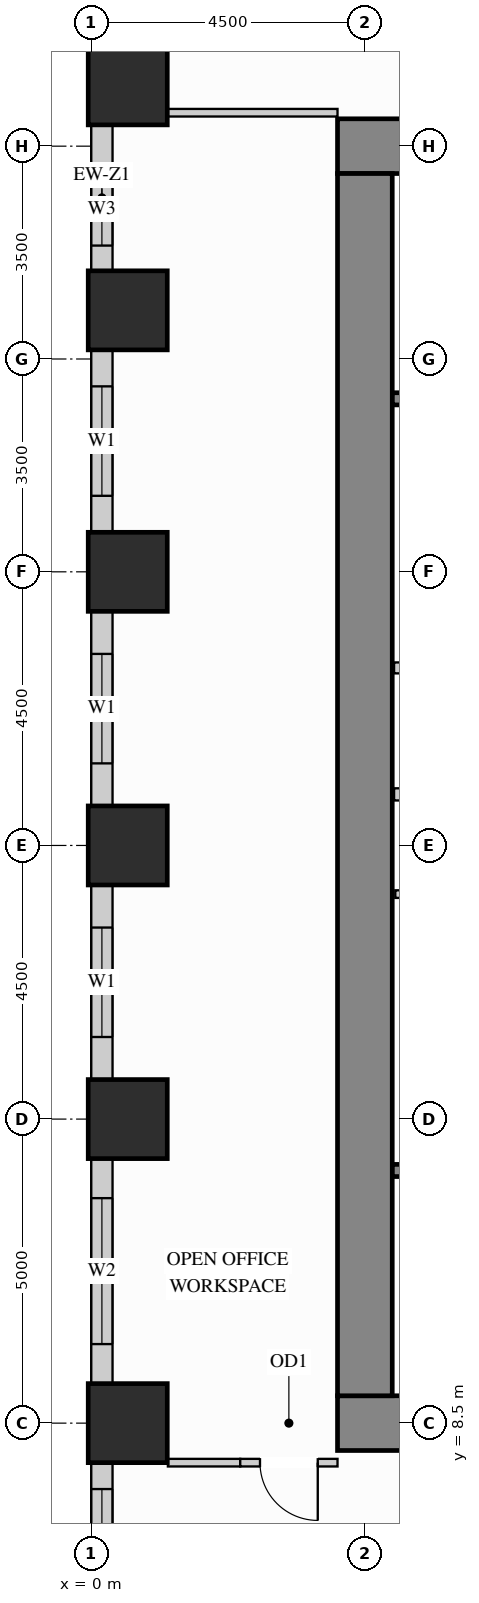
"""IFC4 building model, lengths in metres.
Left out: names, types, materials, properties, quantities, classifications, styles, units other than length and angle.
Written with IfcOpenShell. Run it as: python <this file> out.ifc"""

import sys

from ifc_helpers import new_model, si_unit, direction, frame, frame_2d, origin, origin_2d, place, context, subcontext, project, spatial, rectangle, extrude, source, transform, mapped, element, fill, save


model = new_model("IFC4")
c1 = context("Model", 3, precision=1e-05, world=origin(), true_north=direction((0.0, 1.0)))
c2 = subcontext(c1, "Body", "Model", "MODEL_VIEW")
j1 = project(units=[si_unit("LENGTHUNIT", "METRE"), si_unit("PLANEANGLEUNIT", "RADIAN")], contexts=[c1])
p1 = place(None, origin())
s1 = spatial("IfcSite", under=j1, at=p1, CompositionType="ELEMENT")
p2 = place(p1, origin())
s2 = spatial("IfcBuilding", under=s1, at=p2, CompositionType="ELEMENT")
p3 = place(p2, frame((0.0, 0.0, 65.7)))
s3 = spatial("IfcBuildingStorey", under=s2, at=p3, CompositionType="ELEMENT", Elevation=65.7)
m1 = source(origin(), c2, "Body", "SweptSolid", [
    extrude(rectangle(XDim=1.3, YDim=1.3, at=origin_2d()), origin(), (0.0, 0.0, 1.0), 3.38),
])
for number, where, z_axis, x_axis in (
    (1, (0.6, 13.5, 0.0), (0.0, 0.0, 1.0), (1.0, 0.0, 0.0)),
    (2, (0.6, 18.0, 0.0), (0.0, 0.0, 1.0), (1.0, 0.0, 0.0)),
    (3, (0.6, 22.5, 0.0), (0.0, 0.0, 1.0), (1.0, 0.0, 0.0)),
    (4, (0.6, 26.8, 0.0), (0.0, 0.0, 1.0), (1.0, 0.0, 0.0)),
    (5, (0.6, 30.5, 0.0), (0.0, 0.0, 1.0), (1.0, 0.0, 0.0)),
    (6, (0.6, 8.5, 0.0), (0.0, 0.0, 1.0), (1.0, 0.0, 0.0)),
):
    element("IfcColumn", number, at=place(p3, frame(where, z_axis=z_axis, x_axis=x_axis)), inside=s3, PredefinedType="COLUMN", context=c2, shape_type="MappedRepresentation", body=[
        mapped(m1, transform((0.0, 0.0, 0.0), x_axis=(1.0, 0.0, 0.0), y_axis=(0.0, 1.0, 0.0), z_axis=(0.0, 0.0, 1.0))),
    ])
m2 = source(origin(), c2, "Body", "SweptSolid", [
    extrude(rectangle(XDim=10.9, YDim=0.9, at=frame_2d((5.45, 0.0))), origin(), (0.0, 0.0, 1.0), 3.38),
])
for number, where, z_axis, x_axis in (
    (7, (4.05, 29.5, 0.0), (0.0, 0.0, 1.0), (1.0, 0.0, 0.0)),
    (8, (4.05, 8.5, 0.0), (0.0, 0.0, 1.0), (1.0, 0.0, 0.0)),
):
    element("IfcWall", number, at=place(p3, frame(where, z_axis=z_axis, x_axis=x_axis)), inside=s3, PredefinedType="SHEAR", context=c2, shape_type="MappedRepresentation", body=[
        mapped(m2, transform((0.0, 0.0, 0.0), x_axis=(1.0, 0.0, 0.0), y_axis=(0.0, 1.0, 0.0), z_axis=(0.0, 0.0, 1.0))),
    ])
m3 = source(origin(), c2, "Body", "SweptSolid", [
    extrude(rectangle(XDim=20.1, YDim=0.9, at=frame_2d((10.05, 0.0))), origin(), (0.0, 0.0, 1.0), 3.38),
])
p4 = place(p3, frame((4.5, 8.95, 0.0), z_axis=(0.0, 0.0, 1.0), x_axis=(0.0, 1.0, 0.0)))
e9 = element("IfcWall", 9, at=p4, inside=s3, PredefinedType="SHEAR", context=c2, shape_type="MappedRepresentation", body=[
    mapped(m3, transform((0.0, 0.0, 0.0), x_axis=(1.0, 0.0, 0.0), y_axis=(0.0, 1.0, 0.0), z_axis=(0.0, 0.0, 1.0))),
])
p5 = place(p3, frame((0.175, 29.852, 0.0), z_axis=(0.0, 0.0, 1.0), x_axis=(0.0, -1.0, 0.0)))
e10 = element("IfcWall", 10, at=p5, inside=s3, PredefinedType="SOLIDWALL", context=c2, shape_type="SweptSolid", body=[
    extrude(rectangle(XDim=2.404, YDim=0.35, at=frame_2d((1.202, 0.0))), origin(), (0.0, 0.0, 1.0), 2.51),
])
p6 = place(p5, frame((0.787, 0.0, 0.78)))
e11 = element("IfcOpeningElement", 11, at=p6, cuts=e10, PredefinedType="OPENING", context=c2, shape_type="SweptSolid", body=[
    extrude(rectangle(XDim=1.2, YDim=1.55, at=frame_2d((0.6, 0.775))), frame((0.0, 0.185, 0.0), z_axis=(0.0, -1.0, 0.0), x_axis=(1.0, 0.0, 0.0)), (0.0, 0.0, 1.0), 0.37),
])
p7 = place(p3, frame((0.175, 26.152, 0.0), z_axis=(0.0, 0.0, 1.0), x_axis=(0.0, -1.0, 0.0)))
e12 = element("IfcWall", 12, at=p7, inside=s3, PredefinedType="SOLIDWALL", context=c2, shape_type="SweptSolid", body=[
    extrude(rectangle(XDim=3.004, YDim=0.35, at=frame_2d((1.502, 0.0))), origin(), (0.0, 0.0, 1.0), 2.51),
])
p8 = place(p7, frame((0.602, 0.0, 0.78)))
e13 = element("IfcOpeningElement", 13, at=p8, cuts=e12, PredefinedType="OPENING", context=c2, shape_type="SweptSolid", body=[
    extrude(rectangle(XDim=1.8, YDim=1.55, at=frame_2d((0.9, 0.775))), frame((0.0, 0.185, 0.0), z_axis=(0.0, -1.0, 0.0), x_axis=(1.0, 0.0, 0.0)), (0.0, 0.0, 1.0), 0.37),
])
p9 = place(p3, frame((0.175, 21.852, 0.0), z_axis=(0.0, 0.0, 1.0), x_axis=(0.0, -1.0, 0.0)))
e14 = element("IfcWall", 14, at=p9, inside=s3, PredefinedType="SOLIDWALL", context=c2, shape_type="SweptSolid", body=[
    extrude(rectangle(XDim=3.204, YDim=0.35, at=frame_2d((1.602, 0.0))), origin(), (0.0, 0.0, 1.0), 2.51),
])
p10 = place(p9, frame((0.702, 0.0, 0.78)))
e15 = element("IfcOpeningElement", 15, at=p10, cuts=e14, PredefinedType="OPENING", context=c2, shape_type="SweptSolid", body=[
    extrude(rectangle(XDim=1.8, YDim=1.55, at=frame_2d((0.9, 0.775))), frame((0.0, 0.185, 0.0), z_axis=(0.0, -1.0, 0.0), x_axis=(1.0, 0.0, 0.0)), (0.0, 0.0, 1.0), 0.37),
])
p11 = place(p3, frame((0.175, 17.352, 0.0), z_axis=(0.0, 0.0, 1.0), x_axis=(0.0, -1.0, 0.0)))
e16 = element("IfcWall", 16, at=p11, inside=s3, PredefinedType="SOLIDWALL", context=c2, shape_type="SweptSolid", body=[
    extrude(rectangle(XDim=3.204, YDim=0.35, at=frame_2d((1.602, 0.0))), origin(), (0.0, 0.0, 1.0), 2.51),
])
p12 = place(p11, frame((0.702, 0.0, 0.78)))
e17 = element("IfcOpeningElement", 17, at=p12, cuts=e16, PredefinedType="OPENING", context=c2, shape_type="SweptSolid", body=[
    extrude(rectangle(XDim=1.8, YDim=1.55, at=frame_2d((0.9, 0.775))), frame((0.0, 0.185, 0.0), z_axis=(0.0, -1.0, 0.0), x_axis=(1.0, 0.0, 0.0)), (0.0, 0.0, 1.0), 0.37),
])
p13 = place(p3, frame((0.175, 12.852, 0.0), z_axis=(0.0, 0.0, 1.0), x_axis=(0.0, -1.0, 0.0)))
e18 = element("IfcWall", 18, at=p13, inside=s3, PredefinedType="SOLIDWALL", context=c2, shape_type="SweptSolid", body=[
    extrude(rectangle(XDim=3.704, YDim=0.35, at=frame_2d((1.852, 0.0))), origin(), (0.0, 0.0, 1.0), 2.51),
])
p14 = place(p13, frame((0.652, 0.0, 0.78)))
e19 = element("IfcOpeningElement", 19, at=p14, cuts=e18, PredefinedType="OPENING", context=c2, shape_type="SweptSolid", body=[
    extrude(rectangle(XDim=2.4, YDim=1.55, at=frame_2d((1.2, 0.775))), frame((0.0, 0.185, 0.0), z_axis=(0.0, -1.0, 0.0), x_axis=(1.0, 0.0, 0.0)), (0.0, 0.0, 1.0), 0.37),
])
p15 = place(p3, frame((0.175, 7.852, 0.0), z_axis=(0.0, 0.0, 1.0), x_axis=(0.0, -1.0, 0.0)))
e20 = element("IfcWall", 20, at=p15, inside=s3, PredefinedType="SOLIDWALL", context=c2, shape_type="SweptSolid", body=[
    extrude(rectangle(XDim=3.704, YDim=0.35, at=frame_2d((1.852, 0.0))), origin(), (0.0, 0.0, 1.0), 2.51),
])
p16 = place(p15, frame((0.436, 0.0, 0.78)))
e21 = element("IfcOpeningElement", 21, at=p16, cuts=e20, PredefinedType="OPENING", context=c2, shape_type="SweptSolid", body=[
    extrude(rectangle(XDim=2.4, YDim=1.55, at=frame_2d((1.2, 0.775))), frame((0.0, 0.185, 0.0), z_axis=(0.0, -1.0, 0.0), x_axis=(1.0, 0.0, 0.0)), (0.0, 0.0, 1.0), 0.37),
])
m4 = source(origin(), c2, "Body", "SweptSolid", [
    extrude(rectangle(XDim=2.17, YDim=0.18, at=frame_2d((1.085, 0.0))), origin(), (0.0, 0.0, 1.0), 3.365),
])
p17 = place(p3, frame((4.98, 20.92, 0.0), z_axis=(0.0, 0.0, 1.0), x_axis=(1.0, 0.0, 0.0)))
e22 = element("IfcWall", 22, at=p17, inside=s3, PredefinedType="PARTITIONING", context=c2, shape_type="MappedRepresentation", body=[
    mapped(m4, transform((0.0, 0.0, 0.0), x_axis=(1.0, 0.0, 0.0), y_axis=(0.0, 1.0, 0.0), z_axis=(0.0, 0.0, 1.0))),
])
p18 = place(p3, frame((5.0, 17.2, 0.0), z_axis=(0.0, 0.0, 1.0), x_axis=(1.0, 0.0, 0.0)))
e23 = element("IfcWall", 23, at=p18, inside=s3, PredefinedType="PARTITIONING", context=c2, shape_type="SweptSolid", body=[
    extrude(rectangle(XDim=2.4, YDim=0.125, at=frame_2d((1.2, 0.0))), origin(), (0.0, 0.0, 1.0), 3.365),
])
p19 = place(p18, frame((0.7, 0.0, 0.0)))
e24 = element("IfcOpeningElement", 24, at=p19, cuts=e23, PredefinedType="OPENING", context=c2, shape_type="SweptSolid", body=[
    extrude(rectangle(XDim=0.85, YDim=2.1, at=frame_2d((0.425, 1.05))), frame((0.0, 0.073, 0.0), z_axis=(0.0, -1.0, 0.0), x_axis=(1.0, 0.0, 0.0)), (0.0, 0.0, 1.0), 0.145),
])
m5 = source(origin(), c2, "Body", "SweptSolid", [
    extrude(rectangle(XDim=2.79, YDim=0.125, at=frame_2d((1.395, 0.0))), origin(), (0.0, 0.0, 1.0), 3.365),
])
p20 = place(p3, frame((1.26, 30.05, 0.0), z_axis=(0.0, 0.0, 1.0), x_axis=(1.0, 0.0, 0.0)))
e25 = element("IfcWall", 25, at=p20, inside=s3, PredefinedType="PARTITIONING", context=c2, shape_type="MappedRepresentation", body=[
    mapped(m5, transform((0.0, 0.0, 0.0), x_axis=(1.0, 0.0, 0.0), y_axis=(0.0, 1.0, 0.0), z_axis=(0.0, 0.0, 1.0))),
])
m6 = source(origin(), c2, "Body", "SweptSolid", [
    extrude(rectangle(XDim=1.19, YDim=0.125, at=frame_2d((0.595, 0.0))), origin(), (0.0, 0.0, 1.0), 3.365),
])
p21 = place(p3, frame((1.26, 7.85, 0.0), z_axis=(0.0, 0.0, 1.0), x_axis=(1.0, 0.0, 0.0)))
e26 = element("IfcWall", 26, at=p21, inside=s3, PredefinedType="PARTITIONING", context=c2, shape_type="MappedRepresentation", body=[
    mapped(m6, transform((0.0, 0.0, 0.0), x_axis=(1.0, 0.0, 0.0), y_axis=(0.0, 1.0, 0.0), z_axis=(0.0, 0.0, 1.0))),
])
p22 = place(p3, frame((2.45, 7.85, 0.0), z_axis=(0.0, 0.0, 1.0), x_axis=(1.0, 0.0, 0.0)))
e27 = element("IfcWall", 27, at=p22, inside=s3, PredefinedType="PARTITIONING", context=c2, shape_type="SweptSolid", body=[
    extrude(rectangle(XDim=1.6, YDim=0.125, at=frame_2d((0.8, 0.0))), origin(), (0.0, 0.0, 1.0), 3.365),
])
p23 = place(p22, frame((0.325, 0.0, 0.0)))
e28 = element("IfcOpeningElement", 28, at=p23, cuts=e27, PredefinedType="OPENING", context=c2, shape_type="SweptSolid", body=[
    extrude(rectangle(XDim=0.95, YDim=2.15, at=frame_2d((0.475, 1.075))), frame((0.0, 0.073, 0.0), z_axis=(0.0, -1.0, 0.0), x_axis=(1.0, 0.0, 0.0)), (0.0, 0.0, 1.0), 0.145),
])
m7 = source(origin(), c2, "Body", "SweptSolid", [
    extrude(rectangle(XDim=2.09, YDim=0.2, at=frame_2d((1.045, 0.0))), origin(), (0.0, 0.0, 1.0), 3.365),
])
p24 = place(p3, frame((4.98, 18.84, 0.0), z_axis=(0.0, 0.0, 1.0), x_axis=(1.0, 0.0, 0.0)))
e29 = element("IfcWall", 29, at=p24, inside=s3, PredefinedType="PARTITIONING", context=c2, shape_type="MappedRepresentation", body=[
    mapped(m7, transform((0.0, 0.0, 0.0), x_axis=(1.0, 0.0, 0.0), y_axis=(0.0, 1.0, 0.0), z_axis=(0.0, 0.0, 1.0))),
])
p25 = place(p3, frame((4.952, 12.655, 0.0), z_axis=(0.0, 0.0, 1.0), x_axis=(1.0, 0.0, 0.0)))
e30 = element("IfcWall", 30, at=p25, inside=s3, PredefinedType="SHEAR", context=c2, shape_type="SweptSolid", body=[
    extrude(rectangle(XDim=7.453, YDim=0.2, at=frame_2d((3.727, 0.0))), origin(), (0.0, 0.0, 1.0), 3.38),
])
p26 = place(p25, frame((0.4, 0.0, 0.0)))
e31 = element("IfcOpeningElement", 31, at=p26, cuts=e30, PredefinedType="OPENING", context=c2, shape_type="SweptSolid", body=[
    extrude(rectangle(XDim=1.1, YDim=2.15, at=frame_2d((0.55, 1.075))), frame((0.0, 0.11, 0.0), z_axis=(0.0, -1.0, 0.0), x_axis=(1.0, 0.0, 0.0)), (0.0, 0.0, 1.0), 0.22),
])
p27 = place(p3, frame((4.952, 25.345, 0.0), z_axis=(0.0, 0.0, 1.0), x_axis=(1.0, 0.0, 0.0)))
e32 = element("IfcWall", 32, at=p27, inside=s3, PredefinedType="SHEAR", context=c2, shape_type="SweptSolid", body=[
    extrude(rectangle(XDim=7.453, YDim=0.2, at=frame_2d((3.727, 0.0))), origin(), (0.0, 0.0, 1.0), 3.38),
])
p28 = place(p27, frame((0.4, 0.0, 0.0)))
e33 = element("IfcOpeningElement", 33, at=p28, cuts=e32, PredefinedType="OPENING", context=c2, shape_type="SweptSolid", body=[
    extrude(rectangle(XDim=1.1, YDim=2.15, at=frame_2d((0.55, 1.075))), frame((0.0, 0.11, 0.0), z_axis=(0.0, -1.0, 0.0), x_axis=(1.0, 0.0, 0.0)), (0.0, 0.0, 1.0), 0.22),
])
m8 = source(origin(), c2, "Body", "SweptSolid", [
    extrude(rectangle(XDim=0.95, YDim=2.15, at=frame_2d((0.475, 1.075))), frame((0.0, 0.025, 0.0), z_axis=(0.0, -1.0, 0.0), x_axis=(1.0, 0.0, 0.0)), (0.0, 0.0, 1.0), 0.05),
])
p29 = place(p23, origin())
e34 = element("IfcDoor", 34, at=p29, inside=s3, OperationType="SINGLE_SWING_RIGHT", PredefinedType="DOOR", context=c2, shape_type="MappedRepresentation", body=[
    mapped(m8, transform((0.0, 0.0, 0.0), x_axis=(1.0, 0.0, 0.0), y_axis=(0.0, 1.0, 0.0), z_axis=(0.0, 0.0, 1.0))),
])
fill(e28, e34)
m9 = source(origin(), c2, "Body", "SweptSolid", [
    extrude(rectangle(XDim=1.8, YDim=1.55, at=frame_2d((0.9, 0.775))), frame((0.0, 0.03, 0.0), z_axis=(0.0, -1.0, 0.0), x_axis=(1.0, 0.0, 0.0)), (0.0, 0.0, 1.0), 0.06),
])
p30 = place(p8, origin())
e35 = element("IfcWindow", 35, at=p30, inside=s3, PartitioningType="SINGLE_PANEL", PredefinedType="WINDOW", context=c2, shape_type="MappedRepresentation", body=[
    mapped(m9, transform((0.0, 0.0, 0.0), x_axis=(1.0, 0.0, 0.0), y_axis=(0.0, 1.0, 0.0), z_axis=(0.0, 0.0, 1.0))),
])
fill(e13, e35)
p31 = place(p10, origin())
e36 = element("IfcWindow", 36, at=p31, inside=s3, PartitioningType="SINGLE_PANEL", PredefinedType="WINDOW", context=c2, shape_type="MappedRepresentation", body=[
    mapped(m9, transform((0.0, 0.0, 0.0), x_axis=(1.0, 0.0, 0.0), y_axis=(0.0, 1.0, 0.0), z_axis=(0.0, 0.0, 1.0))),
])
fill(e15, e36)
p32 = place(p12, origin())
e37 = element("IfcWindow", 37, at=p32, inside=s3, PartitioningType="SINGLE_PANEL", PredefinedType="WINDOW", context=c2, shape_type="MappedRepresentation", body=[
    mapped(m9, transform((0.0, 0.0, 0.0), x_axis=(1.0, 0.0, 0.0), y_axis=(0.0, 1.0, 0.0), z_axis=(0.0, 0.0, 1.0))),
])
fill(e17, e37)
m10 = source(origin(), c2, "Body", "SweptSolid", [
    extrude(rectangle(XDim=2.4, YDim=1.55, at=frame_2d((1.2, 0.775))), frame((0.0, 0.03, 0.0), z_axis=(0.0, -1.0, 0.0), x_axis=(1.0, 0.0, 0.0)), (0.0, 0.0, 1.0), 0.06),
])
p33 = place(p14, origin())
e38 = element("IfcWindow", 38, at=p33, inside=s3, PartitioningType="SINGLE_PANEL", PredefinedType="WINDOW", context=c2, shape_type="MappedRepresentation", body=[
    mapped(m10, transform((0.0, 0.0, 0.0), x_axis=(1.0, 0.0, 0.0), y_axis=(0.0, 1.0, 0.0), z_axis=(0.0, 0.0, 1.0))),
])
fill(e19, e38)
p34 = place(p16, origin())
e39 = element("IfcWindow", 39, at=p34, inside=s3, PartitioningType="SINGLE_PANEL", PredefinedType="WINDOW", context=c2, shape_type="MappedRepresentation", body=[
    mapped(m10, transform((0.0, 0.0, 0.0), x_axis=(1.0, 0.0, 0.0), y_axis=(0.0, 1.0, 0.0), z_axis=(0.0, 0.0, 1.0))),
])
fill(e21, e39)
m11 = source(origin(), c2, "Body", "SweptSolid", [
    extrude(rectangle(XDim=1.2, YDim=1.55, at=frame_2d((0.6, 0.775))), frame((0.0, 0.03, 0.0), z_axis=(0.0, -1.0, 0.0), x_axis=(1.0, 0.0, 0.0)), (0.0, 0.0, 1.0), 0.06),
])
p35 = place(p6, origin())
e40 = element("IfcWindow", 40, at=p35, inside=s3, PartitioningType="SINGLE_PANEL", PredefinedType="WINDOW", context=c2, shape_type="MappedRepresentation", body=[
    mapped(m11, transform((0.0, 0.0, 0.0), x_axis=(1.0, 0.0, 0.0), y_axis=(0.0, 1.0, 0.0), z_axis=(0.0, 0.0, 1.0))),
])
fill(e11, e40)
save(model, sys.argv[1])
